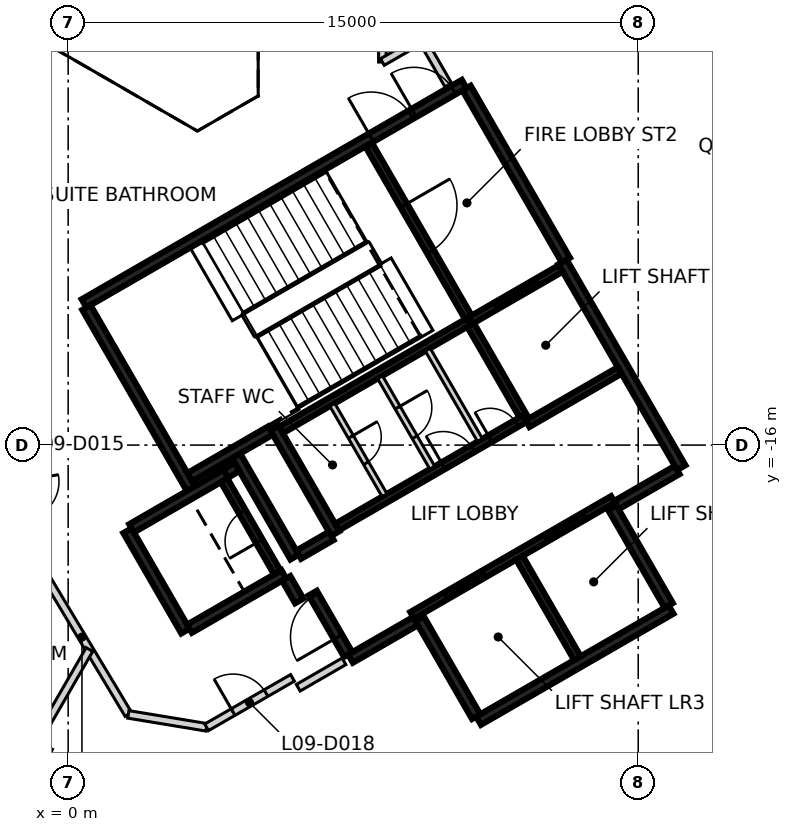
"""IFC4 building model, lengths in metres.
Left out: names, types, materials, properties, quantities, classifications, styles, units other than length and angle.
Written with IfcOpenShell. Run it as: python <this file> out.ifc"""

import sys

from ifc_helpers import new_model, si_unit, direction, frame, frame_2d, origin, place, context, subcontext, project, spatial, rectangle, extrude, element, fill, save


model = new_model("IFC4")
c1 = context("Model", 3, precision=1e-05, world=origin(), true_north=direction((0.0, 1.0)))
c2 = subcontext(c1, "Body", "Model", "MODEL_VIEW")
j1 = project(units=[si_unit("LENGTHUNIT", "METRE"), si_unit("PLANEANGLEUNIT", "RADIAN")], contexts=[c1])
p1 = place(None, origin())
s1 = spatial("IfcSite", under=j1, at=p1, CompositionType="ELEMENT")
p2 = place(p1, origin())
s2 = spatial("IfcBuilding", under=s1, at=p2, CompositionType="ELEMENT")
p3 = place(p2, frame((0.0, 0.0, 45.8)))
s3 = spatial("IfcBuildingStorey", under=s2, at=p3, CompositionType="ELEMENT", Elevation=45.8)
p4 = place(p3, frame((0.417, -12.273, 0.0), z_axis=(0.0, 0.0, 1.0), x_axis=(0.866021906294, 0.500006057782, 0.0)))
e1 = element("IfcWall", 1, at=p4, inside=s3, PredefinedType="SHEAR", context=c2, shape_type="SweptSolid", body=[
    extrude(rectangle(XDim=11.55, YDim=0.25, at=frame_2d((5.775, 0.0))), origin(), (0.0, 0.0, 1.0), 3.125),
])
p5 = place(p4, frame((10.025, 0.0, 0.0)))
e2 = element("IfcOpeningElement", 2, at=p5, cuts=e1, PredefinedType="OPENING", context=c2, shape_type="SweptSolid", body=[
    extrude(rectangle(XDim=1.2, YDim=2.1, at=frame_2d((0.6, 1.05))), frame((0.0, 0.135, 0.0), z_axis=(0.0, -1.0, 0.0), x_axis=(1.0, 0.0, 0.0)), (0.0, 0.0, 1.0), 0.27),
])
p6 = place(p4, frame((8.725, 0.0, 0.0)))
e3 = element("IfcOpeningElement", 3, at=p6, cuts=e1, PredefinedType="OPENING", context=c2, shape_type="SweptSolid", body=[
    extrude(rectangle(XDim=1.2, YDim=2.1, at=frame_2d((0.6, 1.05))), frame((0.0, 0.135, 0.0), z_axis=(0.0, -1.0, 0.0), x_axis=(1.0, 0.0, 0.0)), (0.0, 0.0, 1.0), 0.27),
])
p7 = place(p3, frame((13.008, -11.181, 0.0), z_axis=(0.0, 0.0, 1.0), x_axis=(0.500004234368, -0.866022959057, 0.0)))
e4 = element("IfcWall", 4, at=p7, inside=s3, PredefinedType="SHEAR", context=c2, shape_type="SweptSolid", body=[
    extrude(rectangle(XDim=6.25, YDim=0.25, at=frame_2d((3.125, 0.0))), origin(), (0.0, 0.0, 1.0), 3.125),
])
p8 = place(p3, frame((15.865, -20.328, 0.0), z_axis=(0.0, 0.0, 1.0), x_axis=(-0.86602852612, -0.499994591916, 0.0)))
e5 = element("IfcWall", 5, at=p8, inside=s3, PredefinedType="SHEAR", context=c2, shape_type="SweptSolid", body=[
    extrude(rectangle(XDim=5.85, YDim=0.25, at=frame_2d((2.925, 0.0))), origin(), (0.0, 0.0, 1.0), 3.125),
])
p9 = place(p3, frame((3.235, -17.153, 0.0), z_axis=(0.0, 0.0, 1.0), x_axis=(-0.500008851346, 0.866020293397, 0.0)))
e6 = element("IfcWall", 6, at=p9, inside=s3, PredefinedType="SHEAR", context=c2, shape_type="SweptSolid", body=[
    extrude(rectangle(XDim=5.51, YDim=0.25, at=frame_2d((2.755, 0.0))), origin(), (0.0, 0.0, 1.0), 3.125),
])
p10 = place(p3, frame((10.483, -6.606, 0.0), z_axis=(0.0, 0.0, 1.0), x_axis=(0.49999885962, -0.866026062182, 0.0)))
e7 = element("IfcWall", 7, at=p10, inside=s3, PredefinedType="SHEAR", context=c2, shape_type="SweptSolid", body=[
    extrude(rectangle(XDim=5.225, YDim=0.25, at=frame_2d((2.612, 0.0))), origin(), (0.0, 0.0, 1.0), 3.125),
])
p11 = place(p3, frame((7.031, -18.327, 0.0), z_axis=(0.0, 0.0, 1.0), x_axis=(-0.499971222258, 0.866042017984, 0.0)))
e8 = element("IfcWall", 8, at=p11, inside=s3, PredefinedType="SHEAR", context=c2, shape_type="SweptSolid", body=[
    extrude(rectangle(XDim=3.2, YDim=0.25, at=frame_2d((1.6, 0.0))), origin(), (0.0, 0.0, 1.0), 3.125),
])
for number, where, z_axis, x_axis in (
    (9, (14.315, -17.644, 0.0), (0.0, 0.0, 1.0), (0.5, -0.866, 0.0)),
    (10, (10.736, -23.145, 0.0), (0.0, 0.0, 1.0), (-0.5, 0.866, 0.0)),
):
    element("IfcWall", number, at=place(p3, frame(where, z_axis=z_axis, x_axis=x_axis)), inside=s3, PredefinedType="SHEAR", context=c2, shape_type="SweptSolid", body=[
        extrude(rectangle(XDim=2.974, YDim=0.25, at=frame_2d((1.487, 0.0))), origin(), (0.0, 0.0, 1.0), 3.125),
    ])
p12 = place(p3, frame((3.085, -20.894, 0.0), z_axis=(0.0, 0.0, 1.0), x_axis=(-0.499978833458, 0.866037623948, 0.0)))
e11 = element("IfcWall", 11, at=p12, inside=s3, PredefinedType="SHEAR", context=c2, shape_type="SweptSolid", body=[
    extrude(rectangle(XDim=3.05, YDim=0.25, at=frame_2d((1.525, 0.0))), origin(), (0.0, 0.0, 1.0), 3.125),
])
p13 = place(p3, frame((1.669, -18.19, 0.0), z_axis=(0.0, 0.0, 1.0), x_axis=(0.866042235819, 0.499970844928, 0.0)))
e12 = element("IfcWall", 12, at=p13, inside=s3, PredefinedType="SHEAR", context=c2, shape_type="SweptSolid", body=[
    extrude(rectangle(XDim=2.865, YDim=0.25, at=frame_2d((1.432, 0.0))), origin(), (0.0, 0.0, 1.0), 3.125),
])
p14 = place(p3, frame((5.675, -19.399, 0.0), z_axis=(0.0, 0.0, 1.0), x_axis=(-0.866026637627, -0.499997862916, 0.0)))
e13 = element("IfcWall", 13, at=p14, inside=s3, PredefinedType="SHEAR", context=c2, shape_type="SweptSolid", body=[
    extrude(rectangle(XDim=2.865, YDim=0.25, at=frame_2d((1.432, 0.0))), origin(), (0.0, 0.0, 1.0), 3.125),
])
p15 = place(p3, frame((4.414, -16.276, 0.0), z_axis=(0.0, 0.0, 1.0), x_axis=(0.500003324108, -0.866023484601, 0.0)))
e14 = element("IfcWall", 14, at=p15, inside=s3, PredefinedType="SHEAR", context=c2, shape_type="SweptSolid", body=[
    extrude(rectangle(XDim=3.085, YDim=0.25, at=frame_2d((1.542, 0.0))), origin(), (0.0, 0.0, 1.0), 3.125),
])
p16 = place(p3, frame((5.322, -15.619, 0.0), z_axis=(0.0, 0.0, 1.0), x_axis=(-0.866026229868, -0.499998569178, 0.0)))
e15 = element("IfcWall", 15, at=p16, inside=s3, PredefinedType="SHEAR", context=c2, shape_type="SweptSolid", body=[
    extrude(rectangle(XDim=2.449, YDim=0.25, at=frame_2d((1.225, 0.0))), origin(), (0.0, 0.0, 1.0), 3.125),
])
p17 = place(p3, frame((9.14, -20.631, 0.0), z_axis=(0.0, 0.0, 1.0), x_axis=(-0.866043531843, -0.499968599967, 0.0)))
e16 = element("IfcWall", 16, at=p17, inside=s3, PredefinedType="SHEAR", context=c2, shape_type="SweptSolid", body=[
    extrude(rectangle(XDim=1.975, YDim=0.25, at=frame_2d((0.987, 0.0))), origin(), (0.0, 0.0, 1.0), 3.125),
])
p18 = place(p3, frame((16.025, -16.656, 0.0), z_axis=(0.0, 0.0, 1.0), x_axis=(-0.866016279763, -0.500015802937, 0.0)))
e17 = element("IfcWall", 17, at=p18, inside=s3, PredefinedType="SHEAR", context=c2, shape_type="SweptSolid", body=[
    extrude(rectangle(XDim=1.849, YDim=0.25, at=frame_2d((0.925, 0.0))), origin(), (0.0, 0.0, 1.0), 3.125),
])
p19 = place(p3, frame((7.367, -21.51, 0.0), z_axis=(0.0, 0.0, 1.0), x_axis=(-0.499983108224, 0.866035156036, 0.0)))
e18 = element("IfcWall", 18, at=p19, inside=s3, PredefinedType="SHEAR", context=c2, shape_type="SweptSolid", body=[
    extrude(rectangle(XDim=1.865, YDim=0.25, at=frame_2d((0.932, 0.0))), origin(), (0.0, 0.0, 1.0), 3.125),
])
p20 = place(p19, frame((0.535, 0.0, 0.0)))
e19 = element("IfcOpeningElement", 19, at=p20, cuts=e18, PredefinedType="OPENING", context=c2, shape_type="SweptSolid", body=[
    extrude(rectangle(XDim=1.25, YDim=2.1, at=frame_2d((0.625, 1.05))), frame((0.0, 0.135, 0.0), z_axis=(0.0, -1.0, 0.0), x_axis=(1.0, 0.0, 0.0)), (0.0, 0.0, 1.0), 0.27),
])
p21 = place(p3, frame((6.065, -18.885, 0.0), z_axis=(0.0, 0.0, 1.0), x_axis=(0.866017078145, 0.500014420154, 0.0)))
e20 = element("IfcWall", 20, at=p21, inside=s3, PredefinedType="SHEAR", context=c2, shape_type="SweptSolid", body=[
    extrude(rectangle(XDim=0.989, YDim=0.25, at=frame_2d((0.495, 0.0))), origin(), (0.0, 0.0, 1.0), 3.125),
])
p22 = place(p3, frame((6.08, -20.1, 0.0), z_axis=(0.0, 0.0, 1.0), x_axis=(-0.500051773299, 0.865995510393, 0.0)))
e21 = element("IfcWall", 21, at=p22, inside=s3, PredefinedType="SHEAR", context=c2, shape_type="SweptSolid", body=[
    extrude(rectangle(XDim=0.685, YDim=0.25, at=frame_2d((0.342, 0.0))), origin(), (0.0, 0.0, 1.0), 3.125),
])
p23 = place(p3, frame((4.145, -16.749, 0.0), z_axis=(0.0, 0.0, 1.0), x_axis=(0.866185586049, 0.49972245349, 0.0)))
e22 = element("IfcWall", 22, at=p23, inside=s3, PredefinedType="SHEAR", context=c2, shape_type="SweptSolid", body=[
    extrude(rectangle(XDim=0.344, YDim=0.25, at=frame_2d((0.172, 0.0))), origin(), (0.0, 0.0, 1.0), 3.125),
])
p24 = place(p3, frame((9.052, -20.48, 0.0), z_axis=(0.0, 0.0, 1.0), x_axis=(0.866030299012, 0.499991521122, 0.0)))
e23 = element("IfcWall", 23, at=p24, inside=s3, PredefinedType="SHEAR", context=c2, shape_type="SweptSolid", body=[
    extrude(rectangle(XDim=6.1, YDim=0.2, at=frame_2d((3.05, 0.0))), origin(), (0.0, 0.0, 1.0), 3.125),
])
p25 = place(p24, frame((1.0, 0.0, 0.0)))
e24 = element("IfcOpeningElement", 24, at=p25, cuts=e23, PredefinedType="OPENING", context=c2, shape_type="SweptSolid", body=[
    extrude(rectangle(XDim=1.2, YDim=2.1, at=frame_2d((0.6, 1.05))), frame((0.0, 0.11, 0.0), z_axis=(0.0, -1.0, 0.0), x_axis=(1.0, 0.0, 0.0)), (0.0, 0.0, 1.0), 0.22),
])
p26 = place(p24, frame((4.05, 0.0, 0.0)))
e25 = element("IfcOpeningElement", 25, at=p26, cuts=e23, PredefinedType="OPENING", context=c2, shape_type="SweptSolid", body=[
    extrude(rectangle(XDim=1.2, YDim=2.1, at=frame_2d((0.6, 1.05))), frame((0.0, 0.11, 0.0), z_axis=(0.0, -1.0, 0.0), x_axis=(1.0, 0.0, 0.0)), (0.0, 0.0, 1.0), 0.22),
])
p27 = place(p3, frame((10.538, -12.752, 0.0), z_axis=(0.0, 0.0, 1.0), x_axis=(-0.866038630372, -0.499977090179, 0.0)))
e26 = element("IfcWall", 26, at=p27, inside=s3, PredefinedType="SHEAR", context=c2, shape_type="SweptSolid", body=[
    extrude(rectangle(XDim=5.699, YDim=0.2, at=frame_2d((2.85, 0.0))), origin(), (0.0, 0.0, 1.0), 3.125),
])
p28 = place(p3, frame((7.077, -18.156, 0.0), z_axis=(0.0, 0.0, 1.0), x_axis=(0.866038630372, 0.499977090179, 0.0)))
e27 = element("IfcWall", 27, at=p28, inside=s3, PredefinedType="SHEAR", context=c2, shape_type="SweptSolid", body=[
    extrude(rectangle(XDim=5.699, YDim=0.2, at=frame_2d((2.85, 0.0))), origin(), (0.0, 0.0, 1.0), 3.125),
])
p29 = place(p28, frame((3.224, 0.0, 0.0)))
e28 = element("IfcOpeningElement", 28, at=p29, cuts=e27, PredefinedType="OPENING", context=c2, shape_type="SweptSolid", body=[
    extrude(rectangle(XDim=0.9, YDim=2.1, at=frame_2d((0.45, 1.05))), frame((0.0, 0.11, 0.0), z_axis=(0.0, -1.0, 0.0), x_axis=(1.0, 0.0, 0.0)), (0.0, 0.0, 1.0), 0.22),
])
p30 = place(p28, frame((4.649, 0.0, 0.0)))
e29 = element("IfcOpeningElement", 29, at=p30, cuts=e27, PredefinedType="OPENING", context=c2, shape_type="SweptSolid", body=[
    extrude(rectangle(XDim=0.8, YDim=2.1, at=frame_2d((0.4, 1.05))), frame((0.0, 0.11, 0.0), z_axis=(0.0, -1.0, 0.0), x_axis=(1.0, 0.0, 0.0)), (0.0, 0.0, 1.0), 0.22),
])
p31 = place(p3, frame((7.906, -8.094, 0.0), z_axis=(0.0, 0.0, 1.0), x_axis=(0.500024287448, -0.866011380966, 0.0)))
e30 = element("IfcWall", 30, at=p31, inside=s3, PredefinedType="SHEAR", context=c2, shape_type="SweptSolid", body=[
    extrude(rectangle(XDim=5.251, YDim=0.2, at=frame_2d((2.625, 0.0))), origin(), (0.0, 0.0, 1.0), 3.125),
])
p32 = place(p31, frame((1.849, 0.0, 0.0)))
e31 = element("IfcOpeningElement", 31, at=p32, cuts=e30, PredefinedType="OPENING", context=c2, shape_type="SweptSolid", body=[
    extrude(rectangle(XDim=1.4, YDim=2.1, at=frame_2d((0.7, 1.05))), frame((0.0, 0.11, 0.0), z_axis=(0.0, -1.0, 0.0), x_axis=(1.0, 0.0, 0.0)), (0.0, 0.0, 1.0), 0.22),
])
p33 = place(p3, frame((11.875, -18.967, 0.0), z_axis=(0.0, 0.0, 1.0), x_axis=(0.49998131003, -0.866036194175, 0.0)))
e32 = element("IfcWall", 32, at=p33, inside=s3, PredefinedType="SHEAR", context=c2, shape_type="SweptSolid", body=[
    extrude(rectangle(XDim=3.048, YDim=0.2, at=frame_2d((1.524, 0.0))), origin(), (0.0, 0.0, 1.0), 3.125),
])
p34 = place(p3, frame((5.503, -19.352, 0.0), z_axis=(0.0, 0.0, 1.0), x_axis=(-0.499986818241, 0.866033014143, 0.0)))
e33 = element("IfcWall", 33, at=p34, inside=s3, PredefinedType="SHEAR", context=c2, shape_type="SweptSolid", body=[
    extrude(rectangle(XDim=2.798, YDim=0.2, at=frame_2d((1.399, 0.0))), origin(), (0.0, 0.0, 1.0), 3.125),
])
p35 = place(p34, frame((0.949, 0.0, 0.0)))
e34 = element("IfcOpeningElement", 34, at=p35, cuts=e33, PredefinedType="OPENING", context=c2, shape_type="SweptSolid", body=[
    extrude(rectangle(XDim=0.9, YDim=2.1, at=frame_2d((0.45, 1.05))), frame((0.0, 0.11, 0.0), z_axis=(0.0, -1.0, 0.0), x_axis=(1.0, 0.0, 0.0)), (0.0, 0.0, 1.0), 0.22),
])
p36 = place(p3, frame((11.963, -15.22, 0.0), z_axis=(0.0, 0.0, 1.0), x_axis=(-0.500034990121, 0.866005201286, 0.0)))
e35 = element("IfcWall", 35, at=p36, inside=s3, PredefinedType="SHEAR", context=c2, shape_type="SweptSolid", body=[
    extrude(rectangle(XDim=2.75, YDim=0.2, at=frame_2d((1.375, 0.0))), origin(), (0.0, 0.0, 1.0), 3.125),
])
p37 = place(p3, frame((10.587, -12.723, 0.0), z_axis=(0.0, 0.0, 1.0), x_axis=(0.866037306777, 0.499979382845, 0.0)))
e36 = element("IfcWall", 36, at=p37, inside=s3, PredefinedType="SHEAR", context=c2, shape_type="SweptSolid", body=[
    extrude(rectangle(XDim=2.742, YDim=0.2, at=frame_2d((1.371, 0.0))), origin(), (0.0, 0.0, 1.0), 3.125),
])
p38 = place(p37, frame((0.743, 0.0, 0.0)))
e37 = element("IfcOpeningElement", 37, at=p38, cuts=e36, PredefinedType="OPENING", context=c2, shape_type="SweptSolid", body=[
    extrude(rectangle(XDim=1.3, YDim=2.1, at=frame_2d((0.65, 1.05))), frame((0.0, 0.11, 0.0), z_axis=(0.0, -1.0, 0.0), x_axis=(1.0, 0.0, 0.0)), (0.0, 0.0, 1.0), 0.22),
])
p39 = place(p3, frame((14.512, -14.037, 0.0), z_axis=(0.0, 0.0, 1.0), x_axis=(-0.866044696403, -0.499966582715, 0.0)))
e38 = element("IfcWall", 38, at=p39, inside=s3, PredefinedType="SHEAR", context=c2, shape_type="SweptSolid", body=[
    extrude(rectangle(XDim=2.799, YDim=0.2, at=frame_2d((1.399, 0.0))), origin(), (0.0, 0.0, 1.0), 3.125),
])
p40 = place(p3, frame((8.207, -14.214, 0.0), z_axis=(0.0, 0.0, 1.0), x_axis=(0.50002746344, -0.86600954718, 0.0)))
e39 = element("IfcWall", 39, at=p40, inside=s3, PredefinedType="PARTITIONING", context=c2, shape_type="SweptSolid", body=[
    extrude(rectangle(XDim=2.748, YDim=0.15, at=frame_2d((1.374, 0.0))), origin(), (0.0, 0.0, 1.0), 3.125),
])
p41 = place(p40, frame((0.924, 0.0, 0.0)))
e40 = element("IfcOpeningElement", 40, at=p41, cuts=e39, PredefinedType="OPENING", context=c2, shape_type="SweptSolid", body=[
    extrude(rectangle(XDim=0.9, YDim=2.1, at=frame_2d((0.45, 1.05))), frame((0.0, 0.085, 0.0), z_axis=(0.0, -1.0, 0.0), x_axis=(1.0, 0.0, 0.0)), (0.0, 0.0, 1.0), 0.17),
])
p42 = place(p3, frame((9.462, -13.489, 0.0), z_axis=(0.0, 0.0, 1.0), x_axis=(0.499988999718, -0.866031754707, 0.0)))
e41 = element("IfcWall", 41, at=p42, inside=s3, PredefinedType="PARTITIONING", context=c2, shape_type="SweptSolid", body=[
    extrude(rectangle(XDim=2.749, YDim=0.15, at=frame_2d((1.374, 0.0))), origin(), (0.0, 0.0, 1.0), 3.125),
])
p43 = place(p3, frame((6.951, -14.939, 0.0), z_axis=(0.0, 0.0, 1.0), x_axis=(0.499988999718, -0.866031754707, 0.0)))
e42 = element("IfcWall", 42, at=p43, inside=s3, PredefinedType="PARTITIONING", context=c2, shape_type="SweptSolid", body=[
    extrude(rectangle(XDim=2.749, YDim=0.15, at=frame_2d((1.374, 0.0))), origin(), (0.0, 0.0, 1.0), 3.125),
])
p44 = place(p43, frame((0.974, 0.0, 0.0)))
e43 = element("IfcOpeningElement", 43, at=p44, cuts=e42, PredefinedType="OPENING", context=c2, shape_type="SweptSolid", body=[
    extrude(rectangle(XDim=0.8, YDim=2.1, at=frame_2d((0.4, 1.05))), frame((0.0, 0.085, 0.0), z_axis=(0.0, -1.0, 0.0), x_axis=(1.0, 0.0, 0.0)), (0.0, 0.0, 1.0), 0.17),
])
p45 = place(p3, frame((-0.858, -19.017, 0.0), z_axis=(0.0, 0.0, 1.0), x_axis=(0.514647068805, -0.857402119528, 0.0)))
e44 = element("IfcWall", 44, at=p45, inside=s3, PredefinedType="PARTITIONING", context=c2, shape_type="SweptSolid", body=[
    extrude(rectangle(XDim=4.745, YDim=0.2, at=frame_2d((2.373, 0.0))), origin(), (0.0, 0.0, 1.0), 3.125),
])
p46 = place(p3, frame((1.584, -23.086, 0.0), z_axis=(0.0, 0.0, 1.0), x_axis=(0.986633159246, -0.162957077405, 0.0)))
e45 = element("IfcWall", 45, at=p46, inside=s3, PredefinedType="PARTITIONING", context=c2, shape_type="SweptSolid", body=[
    extrude(rectangle(XDim=2.087, YDim=0.2, at=frame_2d((1.043, 0.0))), origin(), (0.0, 0.0, 1.0), 3.125),
])
p47 = place(p3, frame((3.643, -23.426, 0.0), z_axis=(0.0, 0.0, 1.0), x_axis=(0.866654350985, 0.498909045738, 0.0)))
e46 = element("IfcWall", 46, at=p47, inside=s3, PredefinedType="PARTITIONING", context=c2, shape_type="SweptSolid", body=[
    extrude(rectangle(XDim=2.608, YDim=0.2, at=frame_2d((1.304, 0.0))), origin(), (0.0, 0.0, 1.0), 3.125),
])
p48 = place(p47, frame((0.804, 0.0, 0.0)))
e47 = element("IfcOpeningElement", 47, at=p48, cuts=e46, PredefinedType="OPENING", context=c2, shape_type="SweptSolid", body=[
    extrude(rectangle(XDim=1.0, YDim=2.1, at=frame_2d((0.5, 1.05))), frame((0.0, 0.11, 0.0), z_axis=(0.0, -1.0, 0.0), x_axis=(1.0, 0.0, 0.0)), (0.0, 0.0, 1.0), 0.22),
])
p49 = place(p3, frame((6.054, -22.385, 0.0), z_axis=(0.0, 0.0, 1.0), x_axis=(0.86593101922, 0.500163443238, 0.0)))
e48 = element("IfcWall", 48, at=p49, inside=s3, PredefinedType="PARTITIONING", context=c2, shape_type="SweptSolid", body=[
    extrude(rectangle(XDim=1.39, YDim=0.2, at=frame_2d((0.695, 0.0))), origin(), (0.0, 0.0, 1.0), 3.125),
])
p50 = place(p3, frame((8.268, -5.921, 0.0), z_axis=(0.0, 0.0, 1.0), x_axis=(0.0, 1.0, 0.0)))
e49 = element("IfcWall", 49, at=p50, inside=s3, PredefinedType="PARTITIONING", context=c2, shape_type="SweptSolid", body=[
    extrude(rectangle(XDim=1.2, YDim=0.2, at=frame_2d((0.6, 0.0))), origin(), (0.0, 0.0, 1.0), 3.125),
])
p51 = place(p3, frame((8.268, -5.921, 0.0), z_axis=(0.0, 0.0, 1.0), x_axis=(0.866344856625, 0.499446282797, 0.0)))
e50 = element("IfcWall", 50, at=p51, inside=s3, PredefinedType="PARTITIONING", context=c2, shape_type="SweptSolid", body=[
    extrude(rectangle(XDim=1.199, YDim=0.2, at=frame_2d((0.6, 0.0))), origin(), (0.0, 0.0, 1.0), 3.125),
])
p52 = place(p3, frame((9.307, -5.322, 0.0), z_axis=(0.0, 0.0, 1.0), x_axis=(0.500295157811, -0.865854927266, 0.0)))
e51 = element("IfcWall", 51, at=p52, inside=s3, PredefinedType="PARTITIONING", context=c2, shape_type="SweptSolid", body=[
    extrude(rectangle(XDim=1.39, YDim=0.2, at=frame_2d((0.695, 0.0))), origin(), (0.0, 0.0, 1.0), 3.125),
])
p53 = place(p3, frame((-2.462, -26.615, 0.0), z_axis=(0.0, 0.0, 1.0), x_axis=(0.49992636536, 0.86606791259, 0.0)))
e52 = element("IfcWall", 52, at=p53, inside=s3, PredefinedType="PARTITIONING", context=c2, shape_type="SweptSolid", body=[
    extrude(rectangle(XDim=6.046, YDim=0.2, at=frame_2d((3.023, 0.0))), origin(), (0.0, 0.0, 1.0), 3.125),
])
p54 = place(p38, origin())
e53 = element("IfcDoor", 53, at=p54, inside=s3, OperationType="SLIDING_TO_LEFT", PredefinedType="DOOR", context=c2, shape_type="SweptSolid", body=[
    extrude(rectangle(XDim=1.3, YDim=2.1, at=frame_2d((0.65, 1.05))), frame((0.0, 0.025, 0.0), z_axis=(0.0, -1.0, 0.0), x_axis=(1.0, 0.0, 0.0)), (0.0, 0.0, 1.0), 0.05),
])
fill(e37, e53)
p55 = place(p25, origin())
e54 = element("IfcDoor", 54, at=p55, inside=s3, OperationType="DOUBLE_DOOR_SLIDING", PredefinedType="DOOR", context=c2, shape_type="SweptSolid", body=[
    extrude(rectangle(XDim=1.2, YDim=2.1, at=frame_2d((0.6, 1.05))), frame((0.0, 0.025, 0.0), z_axis=(0.0, -1.0, 0.0), x_axis=(1.0, 0.0, 0.0)), (0.0, 0.0, 1.0), 0.05),
])
fill(e24, e54)
p56 = place(p26, origin())
e55 = element("IfcDoor", 55, at=p56, inside=s3, OperationType="DOUBLE_DOOR_SLIDING", PredefinedType="DOOR", context=c2, shape_type="SweptSolid", body=[
    extrude(rectangle(XDim=1.2, YDim=2.1, at=frame_2d((0.6, 1.05))), frame((0.0, 0.025, 0.0), z_axis=(0.0, -1.0, 0.0), x_axis=(1.0, 0.0, 0.0)), (0.0, 0.0, 1.0), 0.05),
])
fill(e25, e55)
p57 = place(p20, origin())
e56 = element("IfcDoor", 56, at=p57, inside=s3, OperationType="SINGLE_SWING_LEFT", PredefinedType="DOOR", context=c2, shape_type="SweptSolid", body=[
    extrude(rectangle(XDim=1.25, YDim=2.1, at=frame_2d((0.625, 1.05))), frame((0.0, 0.025, 0.0), z_axis=(0.0, -1.0, 0.0), x_axis=(1.0, 0.0, 0.0)), (0.0, 0.0, 1.0), 0.05),
])
fill(e19, e56)
p58 = place(p5, origin())
e57 = element("IfcDoor", 57, at=p58, inside=s3, OperationType="SINGLE_SWING_LEFT", PredefinedType="DOOR", context=c2, shape_type="SweptSolid", body=[
    extrude(rectangle(XDim=1.2, YDim=2.1, at=frame_2d((0.6, 1.05))), frame((0.0, 0.025, 0.0), z_axis=(0.0, -1.0, 0.0), x_axis=(1.0, 0.0, 0.0)), (0.0, 0.0, 1.0), 0.05),
])
fill(e2, e57)
p59 = place(p6, origin())
e58 = element("IfcDoor", 58, at=p59, inside=s3, OperationType="SINGLE_SWING_RIGHT", PredefinedType="DOOR", context=c2, shape_type="SweptSolid", body=[
    extrude(rectangle(XDim=1.2, YDim=2.1, at=frame_2d((0.6, 1.05))), frame((0.0, 0.025, 0.0), z_axis=(0.0, -1.0, 0.0), x_axis=(1.0, 0.0, 0.0)), (0.0, 0.0, 1.0), 0.05),
])
fill(e3, e58)
p60 = place(p32, origin())
e59 = element("IfcDoor", 59, at=p60, inside=s3, OperationType="SINGLE_SWING_LEFT", PredefinedType="DOOR", context=c2, shape_type="SweptSolid", body=[
    extrude(rectangle(XDim=1.4, YDim=2.1, at=frame_2d((0.7, 1.05))), frame((0.0, 0.025, 0.0), z_axis=(0.0, -1.0, 0.0), x_axis=(1.0, 0.0, 0.0)), (0.0, 0.0, 1.0), 0.05),
])
fill(e31, e59)
p61 = place(p29, origin())
e60 = element("IfcDoor", 60, at=p61, inside=s3, OperationType="SINGLE_SWING_RIGHT", PredefinedType="DOOR", context=c2, shape_type="SweptSolid", body=[
    extrude(rectangle(XDim=0.9, YDim=2.1, at=frame_2d((0.45, 1.05))), frame((0.0, 0.025, 0.0), z_axis=(0.0, -1.0, 0.0), x_axis=(1.0, 0.0, 0.0)), (0.0, 0.0, 1.0), 0.05),
])
fill(e28, e60)
p62 = place(p30, origin())
e61 = element("IfcDoor", 61, at=p62, inside=s3, OperationType="SINGLE_SWING_LEFT", PredefinedType="DOOR", context=c2, shape_type="SweptSolid", body=[
    extrude(rectangle(XDim=0.8, YDim=2.1, at=frame_2d((0.4, 1.05))), frame((0.0, 0.025, 0.0), z_axis=(0.0, -1.0, 0.0), x_axis=(1.0, 0.0, 0.0)), (0.0, 0.0, 1.0), 0.05),
])
fill(e29, e61)
p63 = place(p35, origin())
e62 = element("IfcDoor", 62, at=p63, inside=s3, OperationType="SINGLE_SWING_RIGHT", PredefinedType="DOOR", context=c2, shape_type="SweptSolid", body=[
    extrude(rectangle(XDim=0.9, YDim=2.1, at=frame_2d((0.45, 1.05))), frame((0.0, 0.025, 0.0), z_axis=(0.0, -1.0, 0.0), x_axis=(1.0, 0.0, 0.0)), (0.0, 0.0, 1.0), 0.05),
])
fill(e34, e62)
p64 = place(p41, origin())
e63 = element("IfcDoor", 63, at=p64, inside=s3, OperationType="SINGLE_SWING_LEFT", PredefinedType="DOOR", context=c2, shape_type="SweptSolid", body=[
    extrude(rectangle(XDim=0.9, YDim=2.1, at=frame_2d((0.45, 1.05))), frame((0.0, 0.025, 0.0), z_axis=(0.0, -1.0, 0.0), x_axis=(1.0, 0.0, 0.0)), (0.0, 0.0, 1.0), 0.05),
])
fill(e40, e63)
p65 = place(p44, origin())
e64 = element("IfcDoor", 64, at=p65, inside=s3, OperationType="SINGLE_SWING_RIGHT", PredefinedType="DOOR", context=c2, shape_type="SweptSolid", body=[
    extrude(rectangle(XDim=0.8, YDim=2.1, at=frame_2d((0.4, 1.05))), frame((0.0, 0.025, 0.0), z_axis=(0.0, -1.0, 0.0), x_axis=(1.0, 0.0, 0.0)), (0.0, 0.0, 1.0), 0.05),
])
fill(e43, e64)
p66 = place(p48, frame((1.0, 0.0, 0.0), z_axis=(0.0, 0.0, 1.0), x_axis=(-1.0, 0.0, 0.0)))
e65 = element("IfcDoor", 65, at=p66, inside=s3, OperationType="SINGLE_SWING_LEFT", PredefinedType="DOOR", context=c2, shape_type="SweptSolid", body=[
    extrude(rectangle(XDim=1.0, YDim=2.1, at=frame_2d((0.5, 1.05))), frame((0.0, 0.025, 0.0), z_axis=(0.0, -1.0, 0.0), x_axis=(1.0, 0.0, 0.0)), (0.0, 0.0, 1.0), 0.05),
])
fill(e47, e65)
save(model, sys.argv[1])
